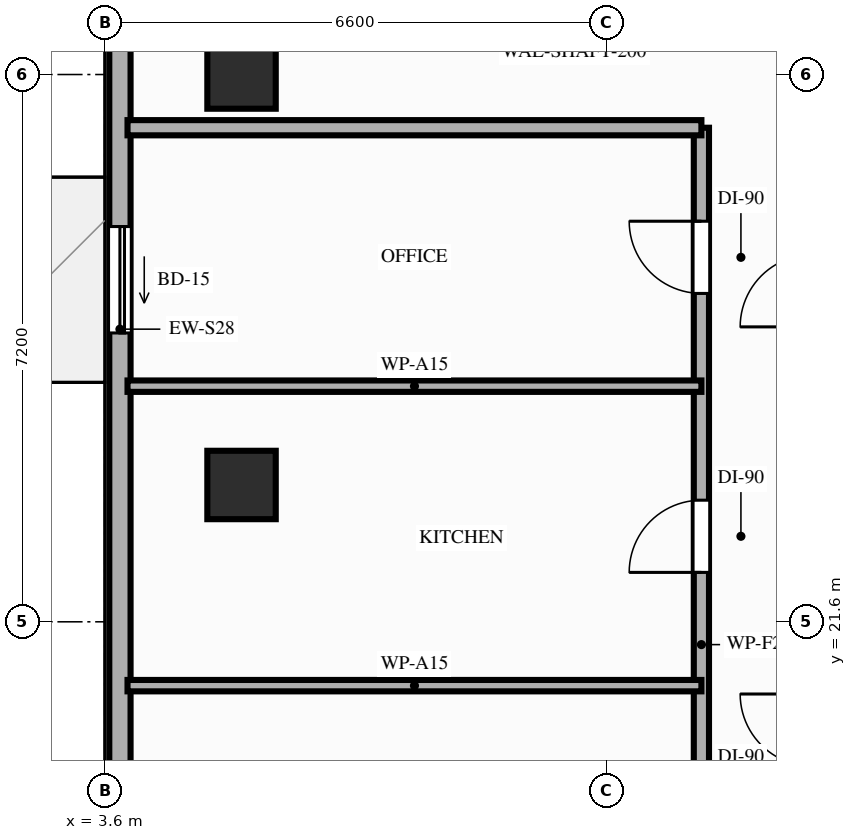
"""IFC4 building model, lengths in metres.
Left out: names, types, materials, properties, quantities, classifications, styles, units other than length and angle.
Written with IfcOpenShell. Run it as: python <this file> out.ifc"""

import sys

from ifc_helpers import new_model, si_unit, direction, frame, frame_2d, origin, origin_2d, place, context, subcontext, project, spatial, rectangle, extrude, element, fill, save


model = new_model("IFC4")
c1 = context("Model", 3, precision=1e-05, world=origin(), true_north=direction((0.0, 1.0)))
c2 = subcontext(c1, "Body", "Model", "MODEL_VIEW")
j1 = project(units=[si_unit("LENGTHUNIT", "METRE"), si_unit("PLANEANGLEUNIT", "RADIAN")], contexts=[c1])
p1 = place(None, origin())
s1 = spatial("IfcSite", under=j1, at=p1, CompositionType="ELEMENT")
p2 = place(p1, origin())
s2 = spatial("IfcBuilding", under=s1, at=p2, CompositionType="ELEMENT")
p3 = place(p2, frame((0.0, 0.0, 198.4)))
s3 = spatial("IfcBuildingStorey", under=s2, at=p3, CompositionType="ELEMENT", Elevation=198.4)
for number, where, z_axis, x_axis in (
    (1, (5.4, 23.4, 0.0), (0.0, 0.0, 1.0), (1.0, 0.0, 0.0)),
    (2, (5.4, 28.8, 0.0), (0.0, 0.0, 1.0), (1.0, 0.0, 0.0)),
):
    element("IfcColumn", number, at=place(p3, frame(where, z_axis=z_axis, x_axis=x_axis)), inside=s3, PredefinedType="COLUMN", context=c2, shape_type="SweptSolid", body=[
        extrude(rectangle(XDim=0.9, YDim=0.9, at=origin_2d()), origin(), (0.0, 0.0, 1.0), 3.2),
    ])
p4 = place(p3, frame((3.8, 42.1, 0.0), z_axis=(0.0, 0.0, 1.0), x_axis=(0.0, -1.0, 0.0)))
e3 = element("IfcWall", 3, at=p4, inside=s3, PredefinedType="STANDARD", context=c2, shape_type="SweptSolid", body=[
    extrude(rectangle(XDim=33.3, YDim=0.28, at=frame_2d((16.65, 0.0))), origin(), (0.0, 0.0, 1.0), 2.71),
])
p5 = place(p4, frame((25.47, 0.0, 0.0)))
e4 = element("IfcOpeningElement", 4, at=p5, cuts=e3, PredefinedType="OPENING", context=c2, shape_type="SweptSolid", body=[
    extrude(rectangle(XDim=1.4, YDim=2.1, at=frame_2d((0.7, 1.05))), frame((0.0, 0.15, 0.0), z_axis=(0.0, -1.0, 0.0), x_axis=(1.0, 0.0, 0.0)), (0.0, 0.0, 1.0), 0.3),
])
p6 = place(p4, frame((15.3, 0.0, 0.0)))
e5 = element("IfcOpeningElement", 5, at=p6, cuts=e3, PredefinedType="OPENING", context=c2, shape_type="SweptSolid", body=[
    extrude(rectangle(XDim=1.4, YDim=2.1, at=frame_2d((0.7, 1.05))), frame((0.0, 0.15, 0.0), z_axis=(0.0, -1.0, 0.0), x_axis=(1.0, 0.0, 0.0)), (0.0, 0.0, 1.0), 0.3),
])
p7 = place(p4, frame((29.33, 0.0, 0.85)))
e6 = element("IfcOpeningElement", 6, at=p7, cuts=e3, PredefinedType="OPENING", context=c2, shape_type="SweptSolid", body=[
    extrude(rectangle(XDim=2.1, YDim=1.61, at=frame_2d((1.05, 0.805))), frame((0.0, 0.15, 0.0), z_axis=(0.0, -1.0, 0.0), x_axis=(1.0, 0.0, 0.0)), (0.0, 0.0, 1.0), 0.3),
])
p8 = place(p4, frame((9.75, 0.0, 0.85)))
e7 = element("IfcOpeningElement", 7, at=p8, cuts=e3, PredefinedType="OPENING", context=c2, shape_type="SweptSolid", body=[
    extrude(rectangle(XDim=2.1, YDim=1.61, at=frame_2d((1.05, 0.805))), frame((0.0, 0.15, 0.0), z_axis=(0.0, -1.0, 0.0), x_axis=(1.0, 0.0, 0.0)), (0.0, 0.0, 1.0), 0.3),
])
p9 = place(p4, frame((3.65, 0.0, 0.85)))
e8 = element("IfcOpeningElement", 8, at=p9, cuts=e3, PredefinedType="OPENING", context=c2, shape_type="SweptSolid", body=[
    extrude(rectangle(XDim=2.1, YDim=1.61, at=frame_2d((1.05, 0.805))), frame((0.0, 0.15, 0.0), z_axis=(0.0, -1.0, 0.0), x_axis=(1.0, 0.0, 0.0)), (0.0, 0.0, 1.0), 0.3),
])
p10 = place(p3, frame((11.45, 14.5, 0.0), z_axis=(0.0, 0.0, 1.0), x_axis=(0.0, 1.0, 0.0)))
e9 = element("IfcWall", 9, at=p10, inside=s3, PredefinedType="PARTITIONING", context=c2, shape_type="SweptSolid", body=[
    extrude(rectangle(XDim=13.6, YDim=0.2, at=frame_2d((6.8, 0.0))), origin(), (0.0, 0.0, 1.0), 2.51),
])
p11 = place(p10, frame((0.95, 0.0, 0.0)))
e10 = element("IfcOpeningElement", 10, at=p11, cuts=e9, PredefinedType="OPENING", context=c2, shape_type="SweptSolid", body=[
    extrude(rectangle(XDim=0.95, YDim=2.15, at=frame_2d((0.475, 1.075))), frame((0.0, 0.11, 0.0), z_axis=(0.0, -1.0, 0.0), x_axis=(1.0, 0.0, 0.0)), (0.0, 0.0, 1.0), 0.22),
])
p12 = place(p10, frame((4.08, 0.0, 0.0)))
e11 = element("IfcOpeningElement", 11, at=p12, cuts=e9, PredefinedType="OPENING", context=c2, shape_type="SweptSolid", body=[
    extrude(rectangle(XDim=0.95, YDim=2.15, at=frame_2d((0.475, 1.075))), frame((0.0, 0.11, 0.0), z_axis=(0.0, -1.0, 0.0), x_axis=(1.0, 0.0, 0.0)), (0.0, 0.0, 1.0), 0.22),
])
p13 = place(p10, frame((7.75, 0.0, 0.0)))
e12 = element("IfcOpeningElement", 12, at=p13, cuts=e9, PredefinedType="OPENING", context=c2, shape_type="SweptSolid", body=[
    extrude(rectangle(XDim=0.95, YDim=2.15, at=frame_2d((0.475, 1.075))), frame((0.0, 0.11, 0.0), z_axis=(0.0, -1.0, 0.0), x_axis=(1.0, 0.0, 0.0)), (0.0, 0.0, 1.0), 0.22),
])
p14 = place(p10, frame((11.42, 0.0, 0.0)))
e13 = element("IfcOpeningElement", 13, at=p14, cuts=e9, PredefinedType="OPENING", context=c2, shape_type="SweptSolid", body=[
    extrude(rectangle(XDim=0.95, YDim=2.15, at=frame_2d((0.475, 1.075))), frame((0.0, 0.11, 0.0), z_axis=(0.0, -1.0, 0.0), x_axis=(1.0, 0.0, 0.0)), (0.0, 0.0, 1.0), 0.22),
])
p15 = place(p3, frame((3.9, 28.1, 0.0), z_axis=(0.0, 0.0, 1.0), x_axis=(1.0, 0.0, 0.0)))
e14 = element("IfcWall", 14, at=p15, inside=s3, PredefinedType="PARTITIONING", context=c2, shape_type="SweptSolid", body=[
    extrude(rectangle(XDim=7.55, YDim=0.2, at=frame_2d((3.775, 0.0))), origin(), (0.0, 0.0, 1.0), 2.51),
])
for number, where, z_axis, x_axis in (
    (15, (3.9, 20.76, 0.0), (0.0, 0.0, 1.0), (1.0, 0.0, 0.0)),
    (16, (3.9, 24.7, 0.0), (0.0, 0.0, 1.0), (1.0, 0.0, 0.0)),
):
    element("IfcWall", number, at=place(p3, frame(where, z_axis=z_axis, x_axis=x_axis)), inside=s3, PredefinedType="PARTITIONING", context=c2, shape_type="SweptSolid", body=[
        extrude(rectangle(XDim=7.55, YDim=0.15, at=frame_2d((3.775, 0.0))), origin(), (0.0, 0.0, 1.0), 2.51),
    ])
p16 = place(p6, origin())
e17 = element("IfcDoor", 17, at=p16, inside=s3, OperationType="SLIDING_TO_RIGHT", PredefinedType="DOOR", context=c2, shape_type="SweptSolid", body=[
    extrude(rectangle(XDim=1.4, YDim=2.1, at=frame_2d((0.7, 1.05))), frame((0.0, 0.025, 0.0), z_axis=(0.0, -1.0, 0.0), x_axis=(1.0, 0.0, 0.0)), (0.0, 0.0, 1.0), 0.05),
])
fill(e5, e17)
p17 = place(p13, origin())
e18 = element("IfcDoor", 18, at=p17, inside=s3, OperationType="SINGLE_SWING_LEFT", PredefinedType="DOOR", context=c2, shape_type="SweptSolid", body=[
    extrude(rectangle(XDim=0.95, YDim=2.15, at=frame_2d((0.475, 1.075))), frame((0.0, 0.025, 0.0), z_axis=(0.0, -1.0, 0.0), x_axis=(1.0, 0.0, 0.0)), (0.0, 0.0, 1.0), 0.05),
])
fill(e12, e18)
p18 = place(p14, origin())
e19 = element("IfcDoor", 19, at=p18, inside=s3, OperationType="SINGLE_SWING_RIGHT", PredefinedType="DOOR", context=c2, shape_type="SweptSolid", body=[
    extrude(rectangle(XDim=0.95, YDim=2.15, at=frame_2d((0.475, 1.075))), frame((0.0, 0.025, 0.0), z_axis=(0.0, -1.0, 0.0), x_axis=(1.0, 0.0, 0.0)), (0.0, 0.0, 1.0), 0.05),
])
fill(e13, e19)
save(model, sys.argv[1])
